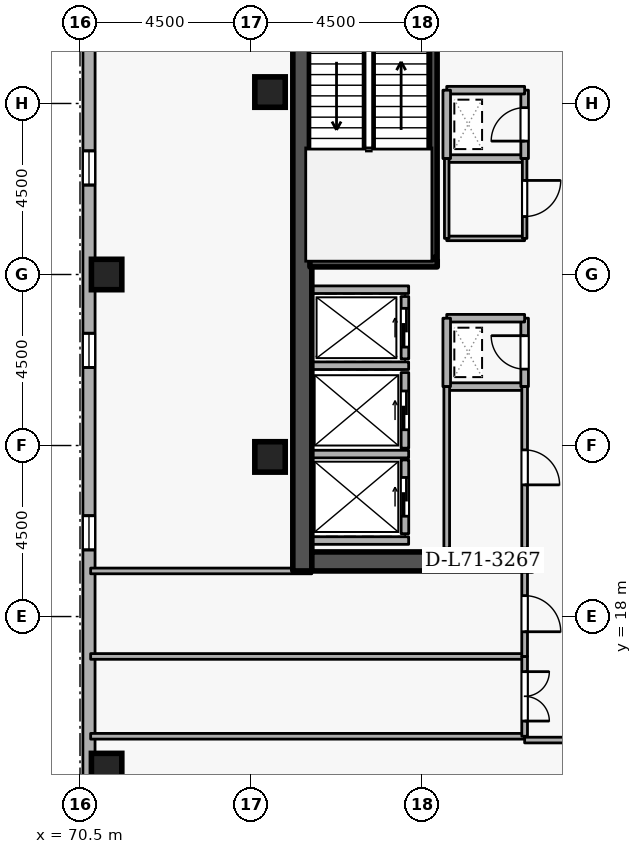
"""IFC4 building model, lengths in metres.
Left out: names, types, materials, properties, quantities, classifications, styles, units other than length and angle.
Written with IfcOpenShell. Run it as: python <this file> out.ifc"""

import sys

from ifc_helpers import new_model, si_unit, direction, frame, frame_2d, origin, origin_2d, place, context, subcontext, project, spatial, rectangle, extrude, element, fill, save


model = new_model("IFC4")
c1 = context("Model", 3, precision=1e-05, world=origin(), true_north=direction((0.0, 1.0)))
c2 = subcontext(c1, "Body", "Model", "MODEL_VIEW")
j1 = project(units=[si_unit("LENGTHUNIT", "METRE"), si_unit("PLANEANGLEUNIT", "RADIAN")], contexts=[c1])
p1 = place(None, origin())
s1 = spatial("IfcSite", under=j1, at=p1, CompositionType="ELEMENT")
p2 = place(p1, origin())
s2 = spatial("IfcBuilding", under=s1, at=p2, CompositionType="ELEMENT")
p3 = place(p2, frame((0.0, 0.0, 265.5)))
s3 = spatial("IfcBuildingStorey", under=s2, at=p3, CompositionType="ELEMENT", Elevation=265.5)
p4 = place(p3, frame((76.35, 19.2, 0.0), z_axis=(0.0, 0.0, 1.0), x_axis=(0.0, 1.0, 0.0)))
e1 = element("IfcWall", 1, at=p4, inside=s3, PredefinedType="SHEAR", context=c2, shape_type="SweptSolid", body=[
    extrude(rectangle(XDim=15.6, YDim=0.5, at=frame_2d((7.8, 0.0))), origin(), (0.0, 0.0, 1.0), 3.6),
])
p5 = place(p3, frame((76.6, 19.45, 0.0), z_axis=(0.0, 0.0, 1.0), x_axis=(1.0, 0.0, 0.0)))
e2 = element("IfcWall", 2, at=p5, inside=s3, PredefinedType="SHEAR", context=c2, shape_type="SweptSolid", body=[
    extrude(rectangle(XDim=5.8, YDim=0.5, at=frame_2d((2.9, 0.0))), origin(), (0.0, 0.0, 1.0), 3.6),
])
for number, where, z_axis, x_axis in (
    (3, (71.2, 14.0, 0.0), (0.0, 0.0, 1.0), (1.0, 0.0, 0.0)),
    (4, (71.2, 27.0, 0.0), (0.0, 0.0, 1.0), (1.0, 0.0, 0.0)),
    (5, (75.5, 22.2, 0.0), (0.0, 0.0, 1.0), (1.0, 0.0, 0.0)),
    (6, (75.5, 31.8, 0.0), (0.0, 0.0, 1.0), (1.0, 0.0, 0.0)),
):
    element("IfcColumn", number, at=place(p3, frame(where, z_axis=z_axis, x_axis=x_axis)), inside=s3, PredefinedType="COLUMN", context=c2, shape_type="SweptSolid", body=[
        extrude(rectangle(XDim=0.8, YDim=0.8, at=origin_2d()), origin(), (0.0, 0.0, 1.0), 3.6),
    ])
p6 = place(p3, frame((70.738, 47.354, 0.0), z_axis=(0.0, 0.0, 1.0), x_axis=(-7.5574884e-05, -0.999999997144, 0.0)))
e7 = element("IfcWall", 7, at=p6, inside=s3, PredefinedType="STANDARD", context=c2, shape_type="SweptSolid", body=[
    extrude(rectangle(XDim=35.535, YDim=0.32, at=frame_2d((17.768, 0.0))), origin(), (0.0, 0.0, 1.0), 2.7),
])
p7 = place(p6, frame((2.7, 0.0, 0.72)))
e8 = element("IfcOpeningElement", 8, at=p7, cuts=e7, PredefinedType="OPENING", context=c2, shape_type="SweptSolid", body=[
    extrude(rectangle(XDim=0.9, YDim=1.75, at=frame_2d((0.45, 0.875))), frame((0.0, 0.17, 0.0), z_axis=(0.0, -1.0, 0.0), x_axis=(1.0, 0.0, 0.0)), (0.0, 0.0, 1.0), 0.34),
])
p8 = place(p6, frame((12.3, 0.0, 0.72)))
e9 = element("IfcOpeningElement", 9, at=p8, cuts=e7, PredefinedType="OPENING", context=c2, shape_type="SweptSolid", body=[
    extrude(rectangle(XDim=0.9, YDim=1.75, at=frame_2d((0.45, 0.875))), frame((0.0, 0.17, 0.0), z_axis=(0.0, -1.0, 0.0), x_axis=(1.0, 0.0, 0.0)), (0.0, 0.0, 1.0), 0.34),
])
p9 = place(p6, frame((17.1, 0.0, 0.72)))
e10 = element("IfcOpeningElement", 10, at=p9, cuts=e7, PredefinedType="OPENING", context=c2, shape_type="SweptSolid", body=[
    extrude(rectangle(XDim=0.9, YDim=1.75, at=frame_2d((0.45, 0.875))), frame((0.0, 0.17, 0.0), z_axis=(0.0, -1.0, 0.0), x_axis=(1.0, 0.0, 0.0)), (0.0, 0.0, 1.0), 0.34),
])
p10 = place(p6, frame((21.9, 0.0, 0.72)))
e11 = element("IfcOpeningElement", 11, at=p10, cuts=e7, PredefinedType="OPENING", context=c2, shape_type="SweptSolid", body=[
    extrude(rectangle(XDim=0.9, YDim=1.75, at=frame_2d((0.45, 0.875))), frame((0.0, 0.17, 0.0), z_axis=(0.0, -1.0, 0.0), x_axis=(1.0, 0.0, 0.0)), (0.0, 0.0, 1.0), 0.34),
])
p11 = place(p6, frame((26.7, 0.0, 0.72)))
e12 = element("IfcOpeningElement", 12, at=p11, cuts=e7, PredefinedType="OPENING", context=c2, shape_type="SweptSolid", body=[
    extrude(rectangle(XDim=0.9, YDim=1.75, at=frame_2d((0.45, 0.875))), frame((0.0, 0.17, 0.0), z_axis=(0.0, -1.0, 0.0), x_axis=(1.0, 0.0, 0.0)), (0.0, 0.0, 1.0), 0.34),
])
p12 = place(p3, frame((79.05, 24.78, 0.0), z_axis=(0.0, 0.0, 1.0), x_axis=(0.0, 1.0, 0.0)))
e13 = element("IfcWall", 13, at=p12, inside=s3, PredefinedType="STANDARD", context=c2, shape_type="SweptSolid", body=[
    extrude(rectangle(XDim=1.64, YDim=0.2, at=frame_2d((0.82, 0.0))), origin(), (0.0, 0.0, 1.0), 3.34),
])
p13 = place(p12, frame((0.31, 0.0, 0.0)))
e14 = element("IfcOpeningElement", 14, at=p13, cuts=e13, PredefinedType="OPENING", context=c2, shape_type="SweptSolid", body=[
    extrude(rectangle(XDim=1.02, YDim=2.06, at=frame_2d((0.51, 1.03))), frame((0.0, 0.11, 0.0), z_axis=(0.0, -1.0, 0.0), x_axis=(1.0, 0.0, 0.0)), (0.0, 0.0, 1.0), 0.22),
])
p14 = place(p3, frame((79.05, 22.43, 0.0), z_axis=(0.0, 0.0, 1.0), x_axis=(0.0, 1.0, 0.0)))
e15 = element("IfcWall", 15, at=p14, inside=s3, PredefinedType="STANDARD", context=c2, shape_type="SweptSolid", body=[
    extrude(rectangle(XDim=1.99, YDim=0.2, at=frame_2d((0.995, 0.0))), origin(), (0.0, 0.0, 1.0), 3.34),
])
p15 = place(p14, frame((0.485, 0.0, 0.0)))
e16 = element("IfcOpeningElement", 16, at=p15, cuts=e15, PredefinedType="OPENING", context=c2, shape_type="SweptSolid", body=[
    extrude(rectangle(XDim=1.02, YDim=2.06, at=frame_2d((0.51, 1.03))), frame((0.0, 0.11, 0.0), z_axis=(0.0, -1.0, 0.0), x_axis=(1.0, 0.0, 0.0)), (0.0, 0.0, 1.0), 0.22),
])
p16 = place(p3, frame((79.05, 20.18, 0.0), z_axis=(0.0, 0.0, 1.0), x_axis=(0.0, 1.0, 0.0)))
e17 = element("IfcWall", 17, at=p16, inside=s3, PredefinedType="STANDARD", context=c2, shape_type="SweptSolid", body=[
    extrude(rectangle(XDim=1.94, YDim=0.2, at=frame_2d((0.97, 0.0))), origin(), (0.0, 0.0, 1.0), 3.34),
])
p17 = place(p16, frame((0.46, 0.0, 0.0)))
e18 = element("IfcOpeningElement", 18, at=p17, cuts=e17, PredefinedType="OPENING", context=c2, shape_type="SweptSolid", body=[
    extrude(rectangle(XDim=1.02, YDim=2.06, at=frame_2d((0.51, 1.03))), frame((0.0, 0.11, 0.0), z_axis=(0.0, -1.0, 0.0), x_axis=(1.0, 0.0, 0.0)), (0.0, 0.0, 1.0), 0.22),
])
for number, where, z_axis, x_axis in (
    (19, (76.612, 26.6, 0.0), (0.0, 0.0, 1.0), (1.0, 0.0, 0.0)),
    (20, (76.612, 24.6, 0.0), (0.0, 0.0, 1.0), (1.0, 0.0, 0.0)),
    (21, (76.612, 22.275, 0.0), (0.0, 0.0, 1.0), (1.0, 0.0, 0.0)),
    (22, (76.612, 20.0, 0.0), (0.0, 0.0, 1.0), (1.0, 0.0, 0.0)),
):
    element("IfcWall", number, at=place(p3, frame(where, z_axis=z_axis, x_axis=x_axis)), inside=s3, PredefinedType="STANDARD", context=c2, shape_type="SweptSolid", body=[
        extrude(rectangle(XDim=2.536, YDim=0.2, at=frame_2d((1.268, 0.0))), origin(), (0.0, 0.0, 1.0), 3.34),
    ])
p18 = place(p3, frame((79.9, 27.3, 0.0), z_axis=(0.0, 0.0, 1.0), x_axis=(-1.0, 0.0, 0.0)))
e23 = element("IfcWall", 23, at=p18, inside=s3, PredefinedType="SHEAR", context=c2, shape_type="SweptSolid", body=[
    extrude(rectangle(XDim=3.35, YDim=0.2, at=frame_2d((1.675, 0.0))), origin(), (0.0, 0.0, 1.0), 3.6),
])
p19 = place(p3, frame((79.797, 27.45, 0.0), z_axis=(0.0, 0.0, 1.0), x_axis=(0.0, 1.0, 0.0)))
e24 = element("IfcWall", 24, at=p19, inside=s3, PredefinedType="SHEAR", context=c2, shape_type="SweptSolid", body=[
    extrude(rectangle(XDim=7.1, YDim=0.2, at=frame_2d((3.55, 0.0))), origin(), (0.0, 0.0, 1.0), 3.6),
])
p20 = place(p3, frame((80.15, 24.05, 0.0), z_axis=(0.0, 0.0, 1.0), x_axis=(1.0, 0.0, 0.0)))
e25 = element("IfcWall", 25, at=p20, inside=s3, PredefinedType="STANDARD", context=c2, shape_type="SweptSolid", body=[
    extrude(rectangle(XDim=2.05, YDim=0.2, at=frame_2d((1.025, 0.0))), origin(), (0.0, 0.0, 1.0), 3.34),
])
p21 = place(p3, frame((82.2, 24.05, 0.0), z_axis=(0.0, 0.0, 1.0), x_axis=(0.0, 1.0, 0.0)))
e26 = element("IfcWall", 26, at=p21, inside=s3, PredefinedType="STANDARD", context=c2, shape_type="SweptSolid", body=[
    extrude(rectangle(XDim=1.8, YDim=0.2, at=frame_2d((0.9, 0.0))), origin(), (0.0, 0.0, 1.0), 3.34),
])
p22 = place(p21, frame((0.46, 0.0, 0.0)))
e27 = element("IfcOpeningElement", 27, at=p22, cuts=e26, PredefinedType="OPENING", context=c2, shape_type="SweptSolid", body=[
    extrude(rectangle(XDim=0.88, YDim=2.04, at=frame_2d((0.44, 1.02))), frame((0.0, 0.11, 0.0), z_axis=(0.0, -1.0, 0.0), x_axis=(1.0, 0.0, 0.0)), (0.0, 0.0, 1.0), 0.22),
])
p23 = place(p3, frame((82.2, 25.85, 0.0), z_axis=(0.0, 0.0, 1.0), x_axis=(-1.0, 0.0, 0.0)))
e28 = element("IfcWall", 28, at=p23, inside=s3, PredefinedType="STANDARD", context=c2, shape_type="SweptSolid", body=[
    extrude(rectangle(XDim=2.05, YDim=0.2, at=frame_2d((1.025, 0.0))), origin(), (0.0, 0.0, 1.0), 3.34),
])
p24 = place(p3, frame((80.15, 25.85, 0.0), z_axis=(0.0, 0.0, 1.0), x_axis=(0.0, -1.0, 0.0)))
e29 = element("IfcWall", 29, at=p24, inside=s3, PredefinedType="STANDARD", context=c2, shape_type="SweptSolid", body=[
    extrude(rectangle(XDim=1.8, YDim=0.2, at=frame_2d((0.9, 0.0))), origin(), (0.0, 0.0, 1.0), 3.34),
])
p25 = place(p3, frame((80.15, 30.05, 0.0), z_axis=(0.0, 0.0, 1.0), x_axis=(1.0, 0.0, 0.0)))
e30 = element("IfcWall", 30, at=p25, inside=s3, PredefinedType="STANDARD", context=c2, shape_type="SweptSolid", body=[
    extrude(rectangle(XDim=2.05, YDim=0.2, at=frame_2d((1.025, 0.0))), origin(), (0.0, 0.0, 1.0), 3.34),
])
p26 = place(p3, frame((82.2, 30.05, 0.0), z_axis=(0.0, 0.0, 1.0), x_axis=(0.0, 1.0, 0.0)))
e31 = element("IfcWall", 31, at=p26, inside=s3, PredefinedType="STANDARD", context=c2, shape_type="SweptSolid", body=[
    extrude(rectangle(XDim=1.8, YDim=0.2, at=frame_2d((0.9, 0.0))), origin(), (0.0, 0.0, 1.0), 3.34),
])
p27 = place(p26, frame((0.46, 0.0, 0.0)))
e32 = element("IfcOpeningElement", 32, at=p27, cuts=e31, PredefinedType="OPENING", context=c2, shape_type="SweptSolid", body=[
    extrude(rectangle(XDim=0.88, YDim=2.04, at=frame_2d((0.44, 1.02))), frame((0.0, 0.11, 0.0), z_axis=(0.0, -1.0, 0.0), x_axis=(1.0, 0.0, 0.0)), (0.0, 0.0, 1.0), 0.22),
])
p28 = place(p3, frame((82.2, 31.85, 0.0), z_axis=(0.0, 0.0, 1.0), x_axis=(-1.0, 0.0, 0.0)))
e33 = element("IfcWall", 33, at=p28, inside=s3, PredefinedType="STANDARD", context=c2, shape_type="SweptSolid", body=[
    extrude(rectangle(XDim=2.05, YDim=0.2, at=frame_2d((1.025, 0.0))), origin(), (0.0, 0.0, 1.0), 3.34),
])
p29 = place(p3, frame((80.15, 31.85, 0.0), z_axis=(0.0, 0.0, 1.0), x_axis=(0.0, -1.0, 0.0)))
e34 = element("IfcWall", 34, at=p29, inside=s3, PredefinedType="STANDARD", context=c2, shape_type="SweptSolid", body=[
    extrude(rectangle(XDim=1.8, YDim=0.2, at=frame_2d((0.9, 0.0))), origin(), (0.0, 0.0, 1.0), 3.34),
])
p30 = place(p3, frame((80.15, 19.8, 0.0), z_axis=(0.0, 0.0, 1.0), x_axis=(0.0, 1.0, 0.0)))
e35 = element("IfcWall", 35, at=p30, inside=s3, PredefinedType="PARTITIONING", context=c2, shape_type="SweptSolid", body=[
    extrude(rectangle(XDim=4.25, YDim=0.15, at=frame_2d((2.125, 0.0))), origin(), (0.0, 0.0, 1.0), 3.34),
])
p31 = place(p3, frame((82.2, 24.05, 0.0), z_axis=(0.0, 0.0, 1.0), x_axis=(0.0, -1.0, 0.0)))
e36 = element("IfcWall", 36, at=p31, inside=s3, PredefinedType="PARTITIONING", context=c2, shape_type="SweptSolid", body=[
    extrude(rectangle(XDim=4.25, YDim=0.15, at=frame_2d((2.125, 0.0))), origin(), (0.0, 0.0, 1.0), 3.34),
])
p32 = place(p31, frame((1.665, 0.0, 0.0)))
e37 = element("IfcOpeningElement", 37, at=p32, cuts=e36, PredefinedType="OPENING", context=c2, shape_type="SweptSolid", body=[
    extrude(rectangle(XDim=0.92, YDim=2.08, at=frame_2d((0.46, 1.04))), frame((0.0, 0.085, 0.0), z_axis=(0.0, -1.0, 0.0), x_axis=(1.0, 0.0, 0.0)), (0.0, 0.0, 1.0), 0.17),
])
p33 = place(p3, frame((82.2, 27.95, 0.0), z_axis=(0.0, 0.0, 1.0), x_axis=(-1.0, 0.0, 0.0)))
e38 = element("IfcWall", 38, at=p33, inside=s3, PredefinedType="PARTITIONING", context=c2, shape_type="SweptSolid", body=[
    extrude(rectangle(XDim=2.05, YDim=0.12, at=frame_2d((1.025, 0.0))), origin(), (0.0, 0.0, 1.0), 3.34),
])
p34 = place(p3, frame((80.15, 27.95, 0.0), z_axis=(0.0, 0.0, 1.0), x_axis=(0.0, 1.0, 0.0)))
e39 = element("IfcWall", 39, at=p34, inside=s3, PredefinedType="PARTITIONING", context=c2, shape_type="SweptSolid", body=[
    extrude(rectangle(XDim=2.1, YDim=0.12, at=frame_2d((1.05, 0.0))), origin(), (0.0, 0.0, 1.0), 3.34),
])
p35 = place(p3, frame((82.2, 30.05, 0.0), z_axis=(0.0, 0.0, 1.0), x_axis=(0.0, -1.0, 0.0)))
e40 = element("IfcWall", 40, at=p35, inside=s3, PredefinedType="PARTITIONING", context=c2, shape_type="SweptSolid", body=[
    extrude(rectangle(XDim=2.1, YDim=0.12, at=frame_2d((1.05, 0.0))), origin(), (0.0, 0.0, 1.0), 3.34),
])
p36 = place(p35, frame((0.575, 0.0, 0.0)))
e41 = element("IfcOpeningElement", 41, at=p36, cuts=e40, PredefinedType="OPENING", context=c2, shape_type="SweptSolid", body=[
    extrude(rectangle(XDim=0.95, YDim=2.1, at=frame_2d((0.475, 1.05))), frame((0.0, 0.07, 0.0), z_axis=(0.0, -1.0, 0.0), x_axis=(1.0, 0.0, 0.0)), (0.0, 0.0, 1.0), 0.14),
])
for number, where, z_axis, x_axis in (
    (42, (82.2, 14.85, 0.0), (0.0, 0.0, 1.0), (-1.0, 0.0, 0.0)),
    (43, (70.78, 16.95, 0.0), (0.0, 0.0, 1.0), (1.0, 0.0, 0.0)),
):
    element("IfcWall", number, at=place(p3, frame(where, z_axis=z_axis, x_axis=x_axis)), inside=s3, PredefinedType="PARTITIONING", context=c2, shape_type="SweptSolid", body=[
        extrude(rectangle(XDim=11.42, YDim=0.15, at=frame_2d((5.71, 0.0))), origin(), (0.0, 0.0, 1.0), 3.34),
    ])
p37 = place(p3, frame((82.2, 16.95, 0.0), z_axis=(0.0, 0.0, 1.0), x_axis=(0.0, -1.0, 0.0)))
e44 = element("IfcWall", 44, at=p37, inside=s3, PredefinedType="PARTITIONING", context=c2, shape_type="SweptSolid", body=[
    extrude(rectangle(XDim=2.1, YDim=0.15, at=frame_2d((1.05, 0.0))), origin(), (0.0, 0.0, 1.0), 3.34),
])
p38 = place(p37, frame((0.4, 0.0, 0.0)))
e45 = element("IfcOpeningElement", 45, at=p38, cuts=e44, PredefinedType="OPENING", context=c2, shape_type="SweptSolid", body=[
    extrude(rectangle(XDim=1.3, YDim=2.12, at=frame_2d((0.65, 1.06))), frame((0.0, 0.085, 0.0), z_axis=(0.0, -1.0, 0.0), x_axis=(1.0, 0.0, 0.0)), (0.0, 0.0, 1.0), 0.17),
])
p39 = place(p3, frame((70.78, 19.2, 0.0), z_axis=(0.0, 0.0, 1.0), x_axis=(1.0, 0.0, 0.0)))
e46 = element("IfcWall", 46, at=p39, inside=s3, PredefinedType="PARTITIONING", context=c2, shape_type="SweptSolid", body=[
    extrude(rectangle(XDim=5.82, YDim=0.15, at=frame_2d((2.91, 0.0))), origin(), (0.0, 0.0, 1.0), 2.545),
])
p40 = place(p3, frame((82.2, 19.2, 0.0), z_axis=(0.0, 0.0, 1.0), x_axis=(0.0, -1.0, 0.0)))
e47 = element("IfcWall", 47, at=p40, inside=s3, PredefinedType="PARTITIONING", context=c2, shape_type="SweptSolid", body=[
    extrude(rectangle(XDim=2.25, YDim=0.15, at=frame_2d((1.125, 0.0))), origin(), (0.0, 0.0, 1.0), 3.34),
])
p41 = place(p40, frame((0.65, 0.0, 0.0)))
e48 = element("IfcOpeningElement", 48, at=p41, cuts=e47, PredefinedType="OPENING", context=c2, shape_type="SweptSolid", body=[
    extrude(rectangle(XDim=0.95, YDim=2.1, at=frame_2d((0.475, 1.05))), frame((0.0, 0.085, 0.0), z_axis=(0.0, -1.0, 0.0), x_axis=(1.0, 0.0, 0.0)), (0.0, 0.0, 1.0), 0.17),
])
p42 = place(p3, frame((82.2, 14.75, 0.0), z_axis=(0.0, 0.0, 1.0), x_axis=(1.0, 0.0, 0.0)))
e49 = element("IfcWall", 49, at=p42, inside=s3, PredefinedType="PARTITIONING", context=c2, shape_type="SweptSolid", body=[
    extrude(rectangle(XDim=1.75, YDim=0.15, at=frame_2d((0.875, 0.0))), origin(), (0.0, 0.0, 1.0), 3.34),
])
p43 = place(p9, origin())
e50 = element("IfcWindow", 50, at=p43, inside=s3, PartitioningType="SINGLE_PANEL", PredefinedType="WINDOW", context=c2, shape_type="SweptSolid", body=[
    extrude(rectangle(XDim=0.9, YDim=1.75, at=frame_2d((0.45, 0.875))), frame((0.0, 0.03, 0.0), z_axis=(0.0, -1.0, 0.0), x_axis=(1.0, 0.0, 0.0)), (0.0, 0.0, 1.0), 0.06),
])
fill(e10, e50)
p44 = place(p10, origin())
e51 = element("IfcWindow", 51, at=p44, inside=s3, PartitioningType="SINGLE_PANEL", PredefinedType="WINDOW", context=c2, shape_type="SweptSolid", body=[
    extrude(rectangle(XDim=0.9, YDim=1.75, at=frame_2d((0.45, 0.875))), frame((0.0, 0.03, 0.0), z_axis=(0.0, -1.0, 0.0), x_axis=(1.0, 0.0, 0.0)), (0.0, 0.0, 1.0), 0.06),
])
fill(e11, e51)
p45 = place(p11, origin())
e52 = element("IfcWindow", 52, at=p45, inside=s3, PartitioningType="SINGLE_PANEL", PredefinedType="WINDOW", context=c2, shape_type="SweptSolid", body=[
    extrude(rectangle(XDim=0.9, YDim=1.75, at=frame_2d((0.45, 0.875))), frame((0.0, 0.03, 0.0), z_axis=(0.0, -1.0, 0.0), x_axis=(1.0, 0.0, 0.0)), (0.0, 0.0, 1.0), 0.06),
])
fill(e12, e52)
p46 = place(p13, origin())
e53 = element("IfcDoor", 53, at=p46, inside=s3, OperationType="SLIDING_TO_LEFT", PredefinedType="DOOR", context=c2, shape_type="SweptSolid", body=[
    extrude(rectangle(XDim=1.02, YDim=2.06, at=frame_2d((0.51, 1.03))), frame((0.0, 0.025, 0.0), z_axis=(0.0, -1.0, 0.0), x_axis=(1.0, 0.0, 0.0)), (0.0, 0.0, 1.0), 0.05),
])
fill(e14, e53)
p47 = place(p15, origin())
e54 = element("IfcDoor", 54, at=p47, inside=s3, OperationType="SLIDING_TO_LEFT", PredefinedType="DOOR", context=c2, shape_type="SweptSolid", body=[
    extrude(rectangle(XDim=1.02, YDim=2.06, at=frame_2d((0.51, 1.03))), frame((0.0, 0.025, 0.0), z_axis=(0.0, -1.0, 0.0), x_axis=(1.0, 0.0, 0.0)), (0.0, 0.0, 1.0), 0.05),
])
fill(e16, e54)
p48 = place(p17, origin())
e55 = element("IfcDoor", 55, at=p48, inside=s3, OperationType="SLIDING_TO_LEFT", PredefinedType="DOOR", context=c2, shape_type="SweptSolid", body=[
    extrude(rectangle(XDim=1.02, YDim=2.06, at=frame_2d((0.51, 1.03))), frame((0.0, 0.025, 0.0), z_axis=(0.0, -1.0, 0.0), x_axis=(1.0, 0.0, 0.0)), (0.0, 0.0, 1.0), 0.05),
])
fill(e18, e55)
p49 = place(p22, origin())
e56 = element("IfcDoor", 56, at=p49, inside=s3, OperationType="SINGLE_SWING_RIGHT", PredefinedType="DOOR", context=c2, shape_type="SweptSolid", body=[
    extrude(rectangle(XDim=0.88, YDim=2.04, at=frame_2d((0.44, 1.02))), frame((0.0, 0.025, 0.0), z_axis=(0.0, -1.0, 0.0), x_axis=(1.0, 0.0, 0.0)), (0.0, 0.0, 1.0), 0.05),
])
fill(e27, e56)
p50 = place(p27, origin())
e57 = element("IfcDoor", 57, at=p50, inside=s3, OperationType="SINGLE_SWING_LEFT", PredefinedType="DOOR", context=c2, shape_type="SweptSolid", body=[
    extrude(rectangle(XDim=0.88, YDim=2.04, at=frame_2d((0.44, 1.02))), frame((0.0, 0.025, 0.0), z_axis=(0.0, -1.0, 0.0), x_axis=(1.0, 0.0, 0.0)), (0.0, 0.0, 1.0), 0.05),
])
fill(e32, e57)
p51 = place(p32, origin())
e58 = element("IfcDoor", 58, at=p51, inside=s3, OperationType="SINGLE_SWING_RIGHT", PredefinedType="DOOR", context=c2, shape_type="SweptSolid", body=[
    extrude(rectangle(XDim=0.92, YDim=2.08, at=frame_2d((0.46, 1.04))), frame((0.0, 0.025, 0.0), z_axis=(0.0, -1.0, 0.0), x_axis=(1.0, 0.0, 0.0)), (0.0, 0.0, 1.0), 0.05),
])
fill(e37, e58)
p52 = place(p36, origin())
e59 = element("IfcDoor", 59, at=p52, inside=s3, OperationType="SINGLE_SWING_LEFT", PredefinedType="DOOR", context=c2, shape_type="SweptSolid", body=[
    extrude(rectangle(XDim=0.95, YDim=2.1, at=frame_2d((0.475, 1.05))), frame((0.0, 0.025, 0.0), z_axis=(0.0, -1.0, 0.0), x_axis=(1.0, 0.0, 0.0)), (0.0, 0.0, 1.0), 0.05),
])
fill(e41, e59)
p53 = place(p38, origin())
e60 = element("IfcDoor", 60, at=p53, inside=s3, OperationType="DOUBLE_DOOR_SINGLE_SWING", PredefinedType="DOOR", context=c2, shape_type="SweptSolid", body=[
    extrude(rectangle(XDim=1.3, YDim=2.12, at=frame_2d((0.65, 1.06))), frame((0.0, 0.025, 0.0), z_axis=(0.0, -1.0, 0.0), x_axis=(1.0, 0.0, 0.0)), (0.0, 0.0, 1.0), 0.05),
])
fill(e45, e60)
p54 = place(p41, origin())
e61 = element("IfcDoor", 61, at=p54, inside=s3, OperationType="SINGLE_SWING_RIGHT", PredefinedType="DOOR", context=c2, shape_type="SweptSolid", body=[
    extrude(rectangle(XDim=0.95, YDim=2.1, at=frame_2d((0.475, 1.05))), frame((0.0, 0.025, 0.0), z_axis=(0.0, -1.0, 0.0), x_axis=(1.0, 0.0, 0.0)), (0.0, 0.0, 1.0), 0.05),
])
fill(e48, e61)
save(model, sys.argv[1])
